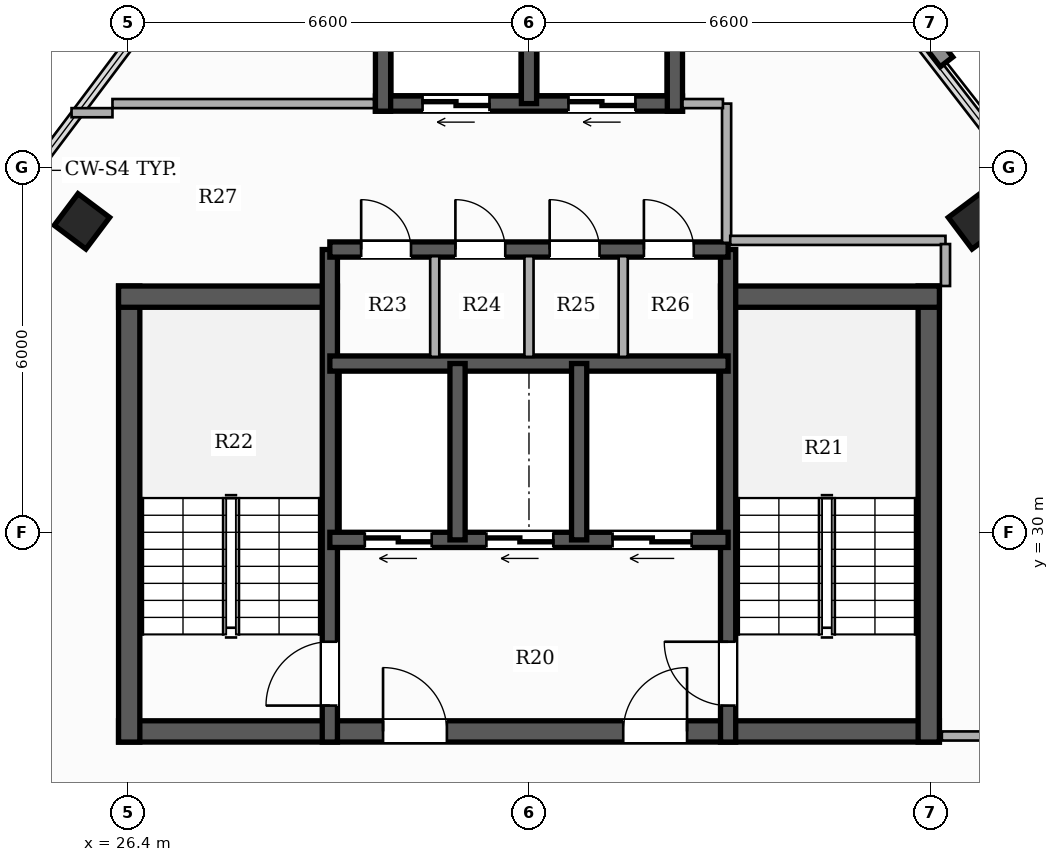
"""IFC4 building model, lengths in metres.
Left out: names, types, materials, properties, quantities, classifications, styles, units other than length and angle.
Written with IfcOpenShell. Run it as: python <this file> out.ifc"""

import sys

from ifc_helpers import new_model, si_unit, direction, frame, frame_2d, origin, origin_2d, place, context, subcontext, project, spatial, rectangle, hollow_rectangle, extrude, element, fill, save


model = new_model("IFC4")
c1 = context("Model", 3, precision=1e-05, world=origin(), true_north=direction((0.0, 1.0)))
c2 = subcontext(c1, "Body", "Model", "MODEL_VIEW")
j1 = project(units=[si_unit("LENGTHUNIT", "METRE"), si_unit("PLANEANGLEUNIT", "RADIAN")], contexts=[c1])
p1 = place(None, origin())
s1 = spatial("IfcSite", under=j1, at=p1, CompositionType="ELEMENT")
p2 = place(p1, origin())
s2 = spatial("IfcBuilding", under=s1, at=p2, CompositionType="ELEMENT")
p3 = place(p2, frame((0.0, 0.0, 273.35)))
s3 = spatial("IfcBuildingStorey", under=s2, at=p3, CompositionType="ELEMENT", Elevation=273.35)
p4 = place(p3, frame((26.25, 26.725, 0.0), z_axis=(0.0, 0.0, 1.0), x_axis=(1.0, 0.0, 0.0)))
e1 = element("IfcWall", 1, at=p4, inside=s3, PredefinedType="SHEAR", context=c2, shape_type="SweptSolid", body=[
    extrude(rectangle(XDim=13.5, YDim=0.35, at=frame_2d((6.75, 0.0))), origin(), (0.0, 0.0, 1.0), 3.3),
])
p5 = place(p4, frame((4.35, 0.0, 0.0)))
e2 = element("IfcOpeningElement", 2, at=p5, cuts=e1, PredefinedType="OPENING", context=c2, shape_type="SweptSolid", body=[
    extrude(rectangle(XDim=1.05, YDim=2.15, at=frame_2d((0.525, 1.075))), frame((0.0, 0.185, 0.0), z_axis=(0.0, -1.0, 0.0), x_axis=(1.0, 0.0, 0.0)), (0.0, 0.0, 1.0), 0.37),
])
p6 = place(p4, frame((8.3, 0.0, 0.0)))
e3 = element("IfcOpeningElement", 3, at=p6, cuts=e1, PredefinedType="OPENING", context=c2, shape_type="SweptSolid", body=[
    extrude(rectangle(XDim=1.05, YDim=2.15, at=frame_2d((0.525, 1.075))), frame((0.0, 0.185, 0.0), z_axis=(0.0, -1.0, 0.0), x_axis=(1.0, 0.0, 0.0)), (0.0, 0.0, 1.0), 0.37),
])
p7 = place(p3, frame((26.425, 26.55, 0.0), z_axis=(0.0, 0.0, 1.0), x_axis=(0.0, 1.0, 0.0)))
e4 = element("IfcWall", 4, at=p7, inside=s3, PredefinedType="SHEAR", context=c2, shape_type="SweptSolid", body=[
    extrude(rectangle(XDim=7.5, YDim=0.35, at=frame_2d((3.75, 0.0))), origin(), (0.0, 0.0, 1.0), 3.3),
])
p8 = place(p3, frame((26.25, 33.875, 0.0), z_axis=(0.0, 0.0, 1.0), x_axis=(1.0, 0.0, 0.0)))
e5 = element("IfcWall", 5, at=p8, inside=s3, PredefinedType="SHEAR", context=c2, shape_type="SweptSolid", body=[
    extrude(rectangle(XDim=3.6, YDim=0.35, at=frame_2d((1.8, 0.0))), origin(), (0.0, 0.0, 1.0), 3.3),
])
p9 = place(p3, frame((39.575, 26.55, 0.0), z_axis=(0.0, 0.0, 1.0), x_axis=(0.0, 1.0, 0.0)))
e6 = element("IfcWall", 6, at=p9, inside=s3, PredefinedType="SHEAR", context=c2, shape_type="SweptSolid", body=[
    extrude(rectangle(XDim=7.5, YDim=0.35, at=frame_2d((3.75, 0.0))), origin(), (0.0, 0.0, 1.0), 3.3),
])
p10 = place(p3, frame((36.15, 33.875, 0.0), z_axis=(0.0, 0.0, 1.0), x_axis=(1.0, 0.0, 0.0)))
e7 = element("IfcWall", 7, at=p10, inside=s3, PredefinedType="SHEAR", context=c2, shape_type="SweptSolid", body=[
    extrude(rectangle(XDim=3.6, YDim=0.35, at=frame_2d((1.8, 0.0))), origin(), (0.0, 0.0, 1.0), 3.3),
])
p11 = place(p3, frame((29.725, 26.55, 0.0), z_axis=(0.0, 0.0, 1.0), x_axis=(0.0, 1.0, 0.0)))
e8 = element("IfcWall", 8, at=p11, inside=s3, PredefinedType="SHEAR", context=c2, shape_type="SweptSolid", body=[
    extrude(rectangle(XDim=8.1, YDim=0.25, at=frame_2d((4.05, 0.0))), origin(), (0.0, 0.0, 1.0), 3.3),
])
p12 = place(p11, frame((0.6, 0.0, 0.0)))
e9 = element("IfcOpeningElement", 9, at=p12, cuts=e8, PredefinedType="OPENING", context=c2, shape_type="SweptSolid", body=[
    extrude(rectangle(XDim=1.05, YDim=2.15, at=frame_2d((0.525, 1.075))), frame((0.0, 0.135, 0.0), z_axis=(0.0, -1.0, 0.0), x_axis=(1.0, 0.0, 0.0)), (0.0, 0.0, 1.0), 0.27),
])
p13 = place(p3, frame((36.275, 26.55, 0.0), z_axis=(0.0, 0.0, 1.0), x_axis=(0.0, 1.0, 0.0)))
e10 = element("IfcWall", 10, at=p13, inside=s3, PredefinedType="SHEAR", context=c2, shape_type="SweptSolid", body=[
    extrude(rectangle(XDim=8.1, YDim=0.25, at=frame_2d((4.05, 0.0))), origin(), (0.0, 0.0, 1.0), 3.3),
])
p14 = place(p13, frame((0.6, 0.0, 0.0)))
e11 = element("IfcOpeningElement", 11, at=p14, cuts=e10, PredefinedType="OPENING", context=c2, shape_type="SweptSolid", body=[
    extrude(rectangle(XDim=1.05, YDim=2.15, at=frame_2d((0.525, 1.075))), frame((0.0, 0.135, 0.0), z_axis=(0.0, -1.0, 0.0), x_axis=(1.0, 0.0, 0.0)), (0.0, 0.0, 1.0), 0.27),
])
p15 = place(p3, frame((36.275, 29.875, 0.0), z_axis=(0.0, 0.0, 1.0), x_axis=(-1.0, 0.0, 0.0)))
e12 = element("IfcWall", 12, at=p15, inside=s3, PredefinedType="SHEAR", context=c2, shape_type="SweptSolid", body=[
    extrude(rectangle(XDim=6.55, YDim=0.25, at=frame_2d((3.275, 0.0))), origin(), (0.0, 0.0, 1.0), 3.3),
])
p16 = place(p15, frame((4.875, 0.0, 0.0)))
e13 = element("IfcOpeningElement", 13, at=p16, cuts=e12, PredefinedType="OPENING", context=c2, shape_type="SweptSolid", body=[
    extrude(rectangle(XDim=1.1, YDim=2.2, at=frame_2d((0.55, 1.1))), frame((0.0, 0.135, 0.0), z_axis=(0.0, -1.0, 0.0), x_axis=(1.0, 0.0, 0.0)), (0.0, 0.0, 1.0), 0.27),
])
p17 = place(p15, frame((2.875, 0.0, 0.0)))
e14 = element("IfcOpeningElement", 14, at=p17, cuts=e12, PredefinedType="OPENING", context=c2, shape_type="SweptSolid", body=[
    extrude(rectangle(XDim=1.1, YDim=2.2, at=frame_2d((0.55, 1.1))), frame((0.0, 0.135, 0.0), z_axis=(0.0, -1.0, 0.0), x_axis=(1.0, 0.0, 0.0)), (0.0, 0.0, 1.0), 0.27),
])
p18 = place(p15, frame((0.6, 0.0, 0.0)))
e15 = element("IfcOpeningElement", 15, at=p18, cuts=e12, PredefinedType="OPENING", context=c2, shape_type="SweptSolid", body=[
    extrude(rectangle(XDim=1.3, YDim=2.2, at=frame_2d((0.65, 1.1))), frame((0.0, 0.135, 0.0), z_axis=(0.0, -1.0, 0.0), x_axis=(1.0, 0.0, 0.0)), (0.0, 0.0, 1.0), 0.27),
])
p19 = place(p3, frame((29.725, 32.775, 0.0), z_axis=(0.0, 0.0, 1.0), x_axis=(1.0, 0.0, 0.0)))
e16 = element("IfcWall", 16, at=p19, inside=s3, PredefinedType="SHEAR", context=c2, shape_type="SweptSolid", body=[
    extrude(rectangle(XDim=6.55, YDim=0.25, at=frame_2d((3.275, 0.0))), origin(), (0.0, 0.0, 1.0), 3.3),
])
for number, where, z_axis, x_axis in (
    (17, (31.825, 29.875, 0.0), (0.0, 0.0, 1.0), (0.0, 1.0, 0.0)),
    (18, (33.825, 29.875, 0.0), (0.0, 0.0, 1.0), (0.0, 1.0, 0.0)),
):
    element("IfcWall", number, at=place(p3, frame(where, z_axis=z_axis, x_axis=x_axis)), inside=s3, PredefinedType="SHEAR", context=c2, shape_type="SweptSolid", body=[
        extrude(rectangle(XDim=2.9, YDim=0.25, at=frame_2d((1.45, 0.0))), origin(), (0.0, 0.0, 1.0), 3.3),
    ])
p20 = place(p3, frame((29.725, 34.65, 0.0), z_axis=(0.0, 0.0, 1.0), x_axis=(1.0, 0.0, 0.0)))
e19 = element("IfcWall", 19, at=p20, inside=s3, PredefinedType="SHEAR", context=c2, shape_type="SweptSolid", body=[
    extrude(rectangle(XDim=6.55, YDim=0.25, at=frame_2d((3.275, 0.0))), origin(), (0.0, 0.0, 1.0), 3.3),
])
p21 = place(p20, frame((0.515, 0.0, 0.0)))
e20 = element("IfcOpeningElement", 20, at=p21, cuts=e19, PredefinedType="OPENING", context=c2, shape_type="SweptSolid", body=[
    extrude(rectangle(XDim=0.82, YDim=2.1, at=frame_2d((0.41, 1.05))), frame((0.0, 0.135, 0.0), z_axis=(0.0, -1.0, 0.0), x_axis=(1.0, 0.0, 0.0)), (0.0, 0.0, 1.0), 0.27),
])
p22 = place(p20, frame((2.065, 0.0, 0.0)))
e21 = element("IfcOpeningElement", 21, at=p22, cuts=e19, PredefinedType="OPENING", context=c2, shape_type="SweptSolid", body=[
    extrude(rectangle(XDim=0.82, YDim=2.1, at=frame_2d((0.41, 1.05))), frame((0.0, 0.135, 0.0), z_axis=(0.0, -1.0, 0.0), x_axis=(1.0, 0.0, 0.0)), (0.0, 0.0, 1.0), 0.27),
])
p23 = place(p20, frame((3.615, 0.0, 0.0)))
e22 = element("IfcOpeningElement", 22, at=p23, cuts=e19, PredefinedType="OPENING", context=c2, shape_type="SweptSolid", body=[
    extrude(rectangle(XDim=0.82, YDim=2.1, at=frame_2d((0.41, 1.05))), frame((0.0, 0.135, 0.0), z_axis=(0.0, -1.0, 0.0), x_axis=(1.0, 0.0, 0.0)), (0.0, 0.0, 1.0), 0.27),
])
p24 = place(p20, frame((5.165, 0.0, 0.0)))
e23 = element("IfcOpeningElement", 23, at=p24, cuts=e19, PredefinedType="OPENING", context=c2, shape_type="SweptSolid", body=[
    extrude(rectangle(XDim=0.82, YDim=2.1, at=frame_2d((0.41, 1.05))), frame((0.0, 0.135, 0.0), z_axis=(0.0, -1.0, 0.0), x_axis=(1.0, 0.0, 0.0)), (0.0, 0.0, 1.0), 0.27),
])
p25 = place(p3, frame((35.525, 37.05, 0.0), z_axis=(0.0, 0.0, 1.0), x_axis=(-1.0, 0.0, 0.0)))
e24 = element("IfcWall", 24, at=p25, inside=s3, PredefinedType="SHEAR", context=c2, shape_type="SweptSolid", body=[
    extrude(rectangle(XDim=5.05, YDim=0.25, at=frame_2d((2.525, 0.0))), origin(), (0.0, 0.0, 1.0), 3.3),
])
p26 = place(p25, frame((3.175, 0.0, 0.0)))
e25 = element("IfcOpeningElement", 25, at=p26, cuts=e24, PredefinedType="OPENING", context=c2, shape_type="SweptSolid", body=[
    extrude(rectangle(XDim=1.1, YDim=2.2, at=frame_2d((0.55, 1.1))), frame((0.0, 0.135, 0.0), z_axis=(0.0, -1.0, 0.0), x_axis=(1.0, 0.0, 0.0)), (0.0, 0.0, 1.0), 0.27),
])
p27 = place(p25, frame((0.775, 0.0, 0.0)))
e26 = element("IfcOpeningElement", 26, at=p27, cuts=e24, PredefinedType="OPENING", context=c2, shape_type="SweptSolid", body=[
    extrude(rectangle(XDim=1.1, YDim=2.2, at=frame_2d((0.55, 1.1))), frame((0.0, 0.135, 0.0), z_axis=(0.0, -1.0, 0.0), x_axis=(1.0, 0.0, 0.0)), (0.0, 0.0, 1.0), 0.27),
])
for number, where, z_axis, x_axis in (
    (27, (30.6, 36.925, 0.0), (0.0, 0.0, 1.0), (0.0, 1.0, 0.0)),
    (28, (35.4, 36.925, 0.0), (0.0, 0.0, 1.0), (0.0, 1.0, 0.0)),
):
    element("IfcWall", number, at=place(p3, frame(where, z_axis=z_axis, x_axis=x_axis)), inside=s3, PredefinedType="SHEAR", context=c2, shape_type="SweptSolid", body=[
        extrude(rectangle(XDim=2.8, YDim=0.25, at=frame_2d((1.4, 0.0))), origin(), (0.0, 0.0, 1.0), 3.3),
    ])
p28 = place(p3, frame((33.0, 37.05, 0.0), z_axis=(0.0, 0.0, 1.0), x_axis=(0.0, 1.0, 0.0)))
e29 = element("IfcWall", 29, at=p28, inside=s3, PredefinedType="SHEAR", context=c2, shape_type="SweptSolid", body=[
    extrude(rectangle(XDim=2.55, YDim=0.25, at=frame_2d((1.275, 0.0))), origin(), (0.0, 0.0, 1.0), 3.3),
])
for number, where, z_axis, x_axis in (
    (30, (25.648, 35.113, 0.0), (0.0, 0.0, 1.0), (0.6, 0.8, 0.0)),
    (31, (40.352, 35.113, 0.0), (0.0, 0.0, 1.0), (-0.6, 0.8, 0.0)),
):
    element("IfcColumn", number, at=place(p3, frame(where, z_axis=z_axis, x_axis=x_axis)), inside=s3, PredefinedType="COLUMN", context=c2, shape_type="SweptSolid", body=[
        extrude(hollow_rectangle(XDim=0.65, YDim=0.65, WallThickness=0.022, at=origin_2d()), origin(), (0.0, 0.0, 1.0), 3.3),
    ])
p29 = place(p3, frame((36.25, 34.76, 0.0), z_axis=(0.0, 0.0, 1.0), x_axis=(0.0, 1.0, 0.0)))
e32 = element("IfcWall", 32, at=p29, inside=s3, PredefinedType="PARTITIONING", context=c2, shape_type="SweptSolid", body=[
    extrude(rectangle(XDim=2.29, YDim=0.15, at=frame_2d((1.145, 0.0))), origin(), (0.0, 0.0, 1.0), 2.385),
])
p30 = place(p3, frame((35.525, 37.05, 0.0), z_axis=(0.0, 0.0, 1.0), x_axis=(1.0, 0.0, 0.0)))
e33 = element("IfcWall", 33, at=p30, inside=s3, PredefinedType="PARTITIONING", context=c2, shape_type="SweptSolid", body=[
    extrude(rectangle(XDim=0.665, YDim=0.15, at=frame_2d((0.333, 0.0))), origin(), (0.0, 0.0, 1.0), 2.385),
])
for number, where, z_axis, x_axis in (
    (34, (31.45, 32.885, 0.0), (0.0, 0.0, 1.0), (0.0, 1.0, 0.0)),
    (35, (33.0, 32.885, 0.0), (0.0, 0.0, 1.0), (0.0, 1.0, 0.0)),
    (36, (34.55, 32.885, 0.0), (0.0, 0.0, 1.0), (0.0, 1.0, 0.0)),
):
    element("IfcWall", number, at=place(p3, frame(where, z_axis=z_axis, x_axis=x_axis)), inside=s3, PredefinedType="PARTITIONING", context=c2, shape_type="SweptSolid", body=[
        extrude(rectangle(XDim=1.655, YDim=0.15, at=frame_2d((0.828, 0.0))), origin(), (0.0, 0.0, 1.0), 3.02),
    ])
p31 = place(p3, frame((25.477, 36.9, 0.0), z_axis=(0.0, 0.0, 1.0), x_axis=(1.0, 0.0, 0.0)))
e37 = element("IfcWall", 37, at=p31, inside=s3, PredefinedType="PARTITIONING", context=c2, shape_type="SweptSolid", body=[
    extrude(rectangle(XDim=0.673, YDim=0.15, at=frame_2d((0.336, 0.0))), origin(), (0.0, 0.0, 1.0), 3.02),
])
p32 = place(p3, frame((39.79, 26.65, 0.0), z_axis=(0.0, 0.0, 1.0), x_axis=(1.0, 0.0, 0.0)))
e38 = element("IfcWall", 38, at=p32, inside=s3, PredefinedType="PARTITIONING", context=c2, shape_type="SweptSolid", body=[
    extrude(rectangle(XDim=2.46, YDim=0.15, at=frame_2d((1.23, 0.0))), origin(), (0.0, 0.0, 1.0), 2.525),
])
p33 = place(p3, frame((26.15, 37.05, 0.0), z_axis=(0.0, 0.0, 1.0), x_axis=(1.0, 0.0, 0.0)))
e39 = element("IfcWall", 39, at=p33, inside=s3, PredefinedType="PARTITIONING", context=c2, shape_type="SweptSolid", body=[
    extrude(rectangle(XDim=4.3, YDim=0.15, at=frame_2d((2.15, 0.0))), origin(), (0.0, 0.0, 1.0), 2.385),
])
p34 = place(p3, frame((36.31, 34.8, 0.0), z_axis=(0.0, 0.0, 1.0), x_axis=(1.0, 0.0, 0.0)))
e40 = element("IfcWall", 40, at=p34, inside=s3, PredefinedType="PARTITIONING", context=c2, shape_type="SweptSolid", body=[
    extrude(rectangle(XDim=3.54, YDim=0.15, at=frame_2d((1.77, 0.0))), origin(), (0.0, 0.0, 1.0), 2.385),
])
p35 = place(p3, frame((39.85, 34.74, 0.0), z_axis=(0.0, 0.0, 1.0), x_axis=(0.0, -1.0, 0.0)))
e41 = element("IfcWall", 41, at=p35, inside=s3, PredefinedType="PARTITIONING", context=c2, shape_type="SweptSolid", body=[
    extrude(rectangle(XDim=0.69, YDim=0.15, at=frame_2d((0.345, 0.0))), origin(), (0.0, 0.0, 1.0), 2.733),
])
p36 = place(p12, origin())
e42 = element("IfcDoor", 42, at=p36, inside=s3, OperationType="SINGLE_SWING_LEFT", PredefinedType="DOOR", context=c2, shape_type="SweptSolid", body=[
    extrude(rectangle(XDim=1.05, YDim=2.15, at=frame_2d((0.525, 1.075))), frame((0.0, 0.025, 0.0), z_axis=(0.0, -1.0, 0.0), x_axis=(1.0, 0.0, 0.0)), (0.0, 0.0, 1.0), 0.05),
])
fill(e9, e42)
p37 = place(p14, origin())
e43 = element("IfcDoor", 43, at=p37, inside=s3, OperationType="SINGLE_SWING_RIGHT", PredefinedType="DOOR", context=c2, shape_type="SweptSolid", body=[
    extrude(rectangle(XDim=1.05, YDim=2.15, at=frame_2d((0.525, 1.075))), frame((0.0, 0.025, 0.0), z_axis=(0.0, -1.0, 0.0), x_axis=(1.0, 0.0, 0.0)), (0.0, 0.0, 1.0), 0.05),
])
fill(e11, e43)
p38 = place(p5, origin())
e44 = element("IfcDoor", 44, at=p38, inside=s3, OperationType="SINGLE_SWING_LEFT", PredefinedType="DOOR", context=c2, shape_type="SweptSolid", body=[
    extrude(rectangle(XDim=1.05, YDim=2.15, at=frame_2d((0.525, 1.075))), frame((0.0, 0.025, 0.0), z_axis=(0.0, -1.0, 0.0), x_axis=(1.0, 0.0, 0.0)), (0.0, 0.0, 1.0), 0.05),
])
fill(e2, e44)
p39 = place(p6, origin())
e45 = element("IfcDoor", 45, at=p39, inside=s3, OperationType="SINGLE_SWING_RIGHT", PredefinedType="DOOR", context=c2, shape_type="SweptSolid", body=[
    extrude(rectangle(XDim=1.05, YDim=2.15, at=frame_2d((0.525, 1.075))), frame((0.0, 0.025, 0.0), z_axis=(0.0, -1.0, 0.0), x_axis=(1.0, 0.0, 0.0)), (0.0, 0.0, 1.0), 0.05),
])
fill(e3, e45)
p40 = place(p16, origin())
e46 = element("IfcDoor", 46, at=p40, inside=s3, OperationType="DOUBLE_DOOR_SLIDING", PredefinedType="DOOR", context=c2, shape_type="SweptSolid", body=[
    extrude(rectangle(XDim=1.1, YDim=2.2, at=frame_2d((0.55, 1.1))), frame((0.0, 0.025, 0.0), z_axis=(0.0, -1.0, 0.0), x_axis=(1.0, 0.0, 0.0)), (0.0, 0.0, 1.0), 0.05),
])
fill(e13, e46)
p41 = place(p17, origin())
e47 = element("IfcDoor", 47, at=p41, inside=s3, OperationType="DOUBLE_DOOR_SLIDING", PredefinedType="DOOR", context=c2, shape_type="SweptSolid", body=[
    extrude(rectangle(XDim=1.1, YDim=2.2, at=frame_2d((0.55, 1.1))), frame((0.0, 0.025, 0.0), z_axis=(0.0, -1.0, 0.0), x_axis=(1.0, 0.0, 0.0)), (0.0, 0.0, 1.0), 0.05),
])
fill(e14, e47)
p42 = place(p18, origin())
e48 = element("IfcDoor", 48, at=p42, inside=s3, OperationType="DOUBLE_DOOR_SLIDING", PredefinedType="DOOR", context=c2, shape_type="SweptSolid", body=[
    extrude(rectangle(XDim=1.3, YDim=2.2, at=frame_2d((0.65, 1.1))), frame((0.0, 0.025, 0.0), z_axis=(0.0, -1.0, 0.0), x_axis=(1.0, 0.0, 0.0)), (0.0, 0.0, 1.0), 0.05),
])
fill(e15, e48)
p43 = place(p26, origin())
e49 = element("IfcDoor", 49, at=p43, inside=s3, OperationType="DOUBLE_DOOR_SLIDING", PredefinedType="DOOR", context=c2, shape_type="SweptSolid", body=[
    extrude(rectangle(XDim=1.1, YDim=2.2, at=frame_2d((0.55, 1.1))), frame((0.0, 0.025, 0.0), z_axis=(0.0, -1.0, 0.0), x_axis=(1.0, 0.0, 0.0)), (0.0, 0.0, 1.0), 0.05),
])
fill(e25, e49)
p44 = place(p27, origin())
e50 = element("IfcDoor", 50, at=p44, inside=s3, OperationType="DOUBLE_DOOR_SLIDING", PredefinedType="DOOR", context=c2, shape_type="SweptSolid", body=[
    extrude(rectangle(XDim=1.1, YDim=2.2, at=frame_2d((0.55, 1.1))), frame((0.0, 0.025, 0.0), z_axis=(0.0, -1.0, 0.0), x_axis=(1.0, 0.0, 0.0)), (0.0, 0.0, 1.0), 0.05),
])
fill(e26, e50)
p45 = place(p21, origin())
e51 = element("IfcDoor", 51, at=p45, inside=s3, OperationType="SINGLE_SWING_LEFT", PredefinedType="DOOR", context=c2, shape_type="SweptSolid", body=[
    extrude(rectangle(XDim=0.82, YDim=2.1, at=frame_2d((0.41, 1.05))), frame((0.0, 0.025, 0.0), z_axis=(0.0, -1.0, 0.0), x_axis=(1.0, 0.0, 0.0)), (0.0, 0.0, 1.0), 0.05),
])
fill(e20, e51)
p46 = place(p22, origin())
e52 = element("IfcDoor", 52, at=p46, inside=s3, OperationType="SINGLE_SWING_LEFT", PredefinedType="DOOR", context=c2, shape_type="SweptSolid", body=[
    extrude(rectangle(XDim=0.82, YDim=2.1, at=frame_2d((0.41, 1.05))), frame((0.0, 0.025, 0.0), z_axis=(0.0, -1.0, 0.0), x_axis=(1.0, 0.0, 0.0)), (0.0, 0.0, 1.0), 0.05),
])
fill(e21, e52)
p47 = place(p23, origin())
e53 = element("IfcDoor", 53, at=p47, inside=s3, OperationType="SINGLE_SWING_LEFT", PredefinedType="DOOR", context=c2, shape_type="SweptSolid", body=[
    extrude(rectangle(XDim=0.82, YDim=2.1, at=frame_2d((0.41, 1.05))), frame((0.0, 0.025, 0.0), z_axis=(0.0, -1.0, 0.0), x_axis=(1.0, 0.0, 0.0)), (0.0, 0.0, 1.0), 0.05),
])
fill(e22, e53)
p48 = place(p24, origin())
e54 = element("IfcDoor", 54, at=p48, inside=s3, OperationType="SINGLE_SWING_LEFT", PredefinedType="DOOR", context=c2, shape_type="SweptSolid", body=[
    extrude(rectangle(XDim=0.82, YDim=2.1, at=frame_2d((0.41, 1.05))), frame((0.0, 0.025, 0.0), z_axis=(0.0, -1.0, 0.0), x_axis=(1.0, 0.0, 0.0)), (0.0, 0.0, 1.0), 0.05),
])
fill(e23, e54)
save(model, sys.argv[1])
